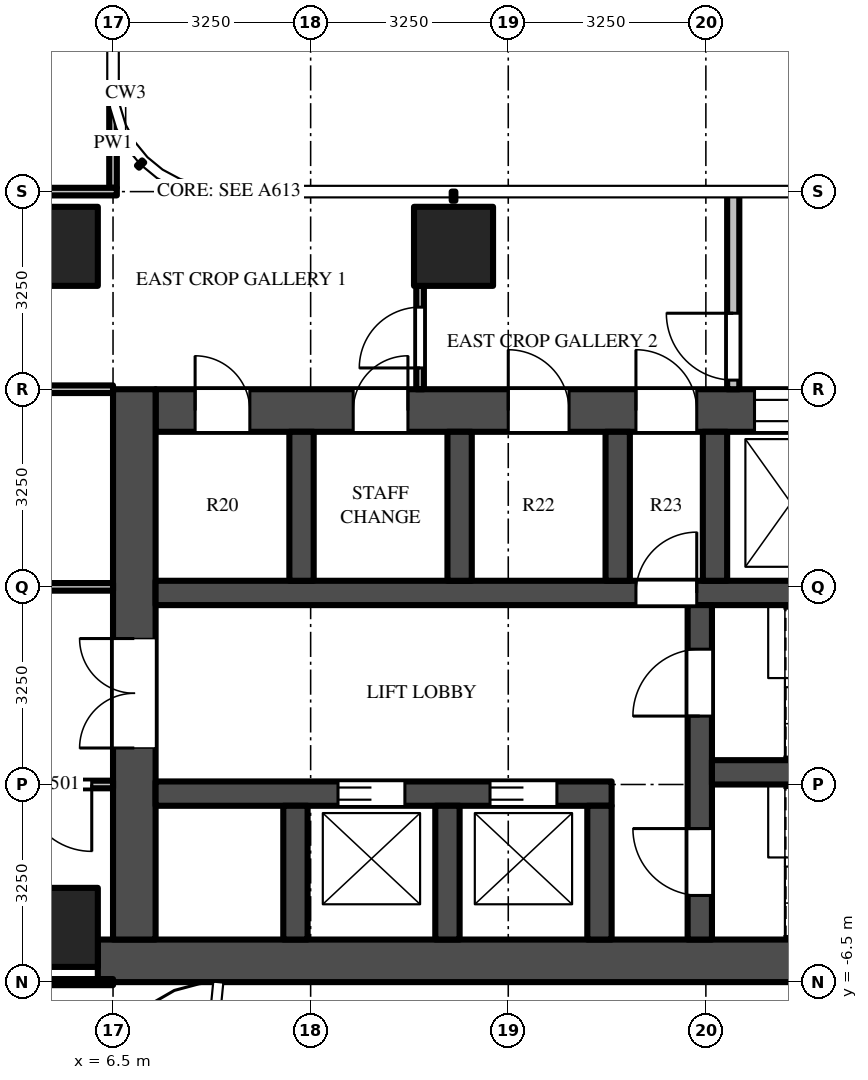
"""IFC4 building model, lengths in metres.
Left out: names, types, materials, properties, quantities, classifications, styles, units other than length and angle.
Written with IfcOpenShell. Run it as: python <this file> out.ifc"""

import sys

from ifc_helpers import new_model, si_unit, direction, frame, frame_2d, origin, origin_2d, place, context, subcontext, project, spatial, rectangle, extrude, source, transform, mapped, element, fill, save


model = new_model("IFC4")
c1 = context("Model", 3, precision=1e-05, world=origin(), true_north=direction((0.0, 1.0)))
c2 = subcontext(c1, "Body", "Model", "MODEL_VIEW")
j1 = project(units=[si_unit("LENGTHUNIT", "METRE"), si_unit("PLANEANGLEUNIT", "RADIAN")], contexts=[c1])
p1 = place(None, origin())
s1 = spatial("IfcSite", under=j1, at=p1, CompositionType="ELEMENT")
p2 = place(p1, origin())
s2 = spatial("IfcBuilding", under=s1, at=p2, CompositionType="ELEMENT")
p3 = place(p2, frame((0.0, 0.0, 106.5)))
s3 = spatial("IfcBuildingStorey", under=s2, at=p3, CompositionType="ELEMENT", Elevation=106.5)
m1 = source(origin(), c2, "Body", "SweptSolid", [
    extrude(rectangle(XDim=1.3, YDim=1.3, at=origin_2d()), origin(), (0.0, 0.0, 1.0), 4.5),
])
for number, where, z_axis, x_axis in (
    (1, (12.1, 5.6, 0.0), (0.0, 0.0, 1.0), (1.0, 0.0, 0.0)),
    (2, (5.6, 5.6, 0.0), (0.0, 0.0, 1.0), (1.0, 0.0, 0.0)),
    (3, (5.6, -5.6, 0.0), (0.0, 0.0, 1.0), (1.0, 0.0, 0.0)),
):
    element("IfcColumn", number, at=place(p3, frame(where, z_axis=z_axis, x_axis=x_axis)), inside=s3, PredefinedType="COLUMN", context=c2, shape_type="MappedRepresentation", body=[
        mapped(m1, transform((0.0, 0.0, 0.0))),
    ])
m2 = source(origin(), c2, "Body", "SweptSolid", [
    extrude(rectangle(XDim=16.5, YDim=0.7, at=frame_2d((8.25, 0.0))), origin(), (0.0, 0.0, 1.0), 4.25),
])
p4 = place(p3, frame((6.25, -6.15, 0.0), z_axis=(0.0, 0.0, 1.0), x_axis=(1.0, 0.0, 0.0)))
e4 = element("IfcWall", 4, at=p4, inside=s3, PredefinedType="SHEAR", context=c2, shape_type="MappedRepresentation", body=[
    mapped(m2, transform((0.0, 0.0, 0.0))),
])
m3 = source(origin(), c2, "Body", "SweptSolid", [
    extrude(rectangle(XDim=14.85, YDim=0.7, at=frame_2d((7.425, 0.0))), origin(), (0.0, 0.0, 1.0), 4.25),
])
p5 = place(p3, frame((7.2, 2.9, 0.0), z_axis=(0.0, 0.0, 1.0), x_axis=(1.0, 0.0, 0.0)))
e5 = element("IfcWall", 5, at=p5, inside=s3, PredefinedType="SHEAR", context=c2, shape_type="MappedRepresentation", body=[
    mapped(m3, transform((0.0, 0.0, 0.0))),
])
m4 = source(origin(), c2, "Body", "SweptSolid", [
    extrude(rectangle(XDim=1.3, YDim=2.1, at=frame_2d((0.65, 1.05))), frame((0.0, 0.36, 0.0), z_axis=(0.0, -1.0, 0.0), x_axis=(1.0, 0.0, 0.0)), (0.0, 0.0, 1.0), 0.72),
])
p6 = place(p5, frame((12.2, 0.0, 0.0)))
e6 = element("IfcOpeningElement", 6, at=p6, cuts=e5, PredefinedType="OPENING", context=c2, shape_type="MappedRepresentation", body=[
    mapped(m4, transform((0.0, 0.0, 0.0))),
])
m5 = source(origin(), c2, "Body", "SweptSolid", [
    extrude(rectangle(XDim=1.2, YDim=2.1, at=frame_2d((0.6, 1.05))), frame((0.0, 0.36, 0.0), z_axis=(0.0, -1.0, 0.0), x_axis=(1.0, 0.0, 0.0)), (0.0, 0.0, 1.0), 0.72),
])
p7 = place(p5, frame((9.85, 0.0, 0.0)))
e7 = element("IfcOpeningElement", 7, at=p7, cuts=e5, PredefinedType="OPENING", context=c2, shape_type="MappedRepresentation", body=[
    mapped(m5, transform((0.0, 0.0, 0.0))),
])
m6 = source(origin(), c2, "Body", "SweptSolid", [
    extrude(rectangle(XDim=1.0, YDim=2.1, at=frame_2d((0.5, 1.05))), frame((0.0, 0.36, 0.0), z_axis=(0.0, -1.0, 0.0), x_axis=(1.0, 0.0, 0.0)), (0.0, 0.0, 1.0), 0.72),
])
p8 = place(p5, frame((7.9, 0.0, 0.0)))
e8 = element("IfcOpeningElement", 8, at=p8, cuts=e5, PredefinedType="OPENING", context=c2, shape_type="MappedRepresentation", body=[
    mapped(m6, transform((0.0, 0.0, 0.0))),
])
m7 = source(origin(), c2, "Body", "SweptSolid", [
    extrude(rectangle(XDim=0.9, YDim=2.1, at=frame_2d((0.45, 1.05))), frame((0.0, 0.36, 0.0), z_axis=(0.0, -1.0, 0.0), x_axis=(1.0, 0.0, 0.0)), (0.0, 0.0, 1.0), 0.72),
])
p9 = place(p5, frame((0.65, 0.0, 0.0)))
e9 = element("IfcOpeningElement", 9, at=p9, cuts=e5, PredefinedType="OPENING", context=c2, shape_type="MappedRepresentation", body=[
    mapped(m7, transform((0.0, 0.0, 0.0))),
])
p10 = place(p5, frame((3.25, 0.0, 0.0)))
e10 = element("IfcOpeningElement", 10, at=p10, cuts=e5, PredefinedType="OPENING", context=c2, shape_type="MappedRepresentation", body=[
    mapped(m7, transform((0.0, 0.0, 0.0))),
])
p11 = place(p5, frame((5.8, 0.0, 0.0)))
e11 = element("IfcOpeningElement", 11, at=p11, cuts=e5, PredefinedType="OPENING", context=c2, shape_type="MappedRepresentation", body=[
    mapped(m6, transform((0.0, 0.0, 0.0))),
])
m8 = source(origin(), c2, "Body", "SweptSolid", [
    extrude(rectangle(XDim=9.05, YDim=0.7, at=frame_2d((4.525, 0.0))), origin(), (0.0, 0.0, 1.0), 4.25),
])
p12 = place(p3, frame((6.85, -5.8, 0.0), z_axis=(0.0, 0.0, 1.0), x_axis=(0.0, 1.0, 0.0)))
e12 = element("IfcWall", 12, at=p12, inside=s3, PredefinedType="SHEAR", context=c2, shape_type="MappedRepresentation", body=[
    mapped(m8, transform((0.0, 0.0, 0.0))),
])
m9 = source(origin(), c2, "Body", "SweptSolid", [
    extrude(rectangle(XDim=1.8, YDim=2.1, at=frame_2d((0.9, 1.05))), frame((0.0, 0.36, 0.0), z_axis=(0.0, -1.0, 0.0), x_axis=(1.0, 0.0, 0.0)), (0.0, 0.0, 1.0), 0.72),
])
p13 = place(p12, frame((3.15, 0.0, 0.0)))
e13 = element("IfcOpeningElement", 13, at=p13, cuts=e12, PredefinedType="OPENING", context=c2, shape_type="MappedRepresentation", body=[
    mapped(m9, transform((0.0, 0.0, 0.0))),
])
m10 = source(origin(), c2, "Body", "SweptSolid", [
    extrude(rectangle(XDim=7.5, YDim=0.4, at=frame_2d((3.75, 0.0))), origin(), (0.0, 0.0, 1.0), 4.25),
])
p14 = place(p3, frame((7.2, -3.4, 0.0), z_axis=(0.0, 0.0, 1.0), x_axis=(1.0, 0.0, 0.0)))
e14 = element("IfcWall", 14, at=p14, inside=s3, PredefinedType="SHEAR", context=c2, shape_type="MappedRepresentation", body=[
    mapped(m10, transform((0.0, 0.0, 0.0))),
])
m11 = source(origin(), c2, "Body", "SweptSolid", [
    extrude(rectangle(XDim=1.1, YDim=2.1, at=frame_2d((0.55, 1.05))), frame((0.0, 0.21, 0.0), z_axis=(0.0, -1.0, 0.0), x_axis=(1.0, 0.0, 0.0)), (0.0, 0.0, 1.0), 0.42),
])
p15 = place(p14, frame((3.0, 0.0, 0.0)))
e15 = element("IfcOpeningElement", 15, at=p15, cuts=e14, PredefinedType="OPENING", context=c2, shape_type="MappedRepresentation", body=[
    mapped(m11, transform((0.0, 0.0, 0.0))),
])
p16 = place(p14, frame((5.5, 0.0, 0.0)))
e16 = element("IfcOpeningElement", 16, at=p16, cuts=e14, PredefinedType="OPENING", context=c2, shape_type="MappedRepresentation", body=[
    mapped(m11, transform((0.0, 0.0, 0.0))),
])
m12 = source(origin(), c2, "Body", "SweptSolid", [
    extrude(rectangle(XDim=14.85, YDim=0.4, at=frame_2d((7.425, 0.0))), origin(), (0.0, 0.0, 1.0), 4.25),
])
p17 = place(p3, frame((7.2, -0.1, 0.0), z_axis=(0.0, 0.0, 1.0), x_axis=(1.0, 0.0, 0.0)))
e17 = element("IfcWall", 17, at=p17, inside=s3, PredefinedType="SHEAR", context=c2, shape_type="MappedRepresentation", body=[
    mapped(m12, transform((0.0, 0.0, 0.0))),
])
m13 = source(origin(), c2, "Body", "SweptSolid", [
    extrude(rectangle(XDim=1.0, YDim=2.1, at=frame_2d((0.5, 1.05))), frame((0.0, 0.21, 0.0), z_axis=(0.0, -1.0, 0.0), x_axis=(1.0, 0.0, 0.0)), (0.0, 0.0, 1.0), 0.42),
])
p18 = place(p17, frame((7.9, 0.0, 0.0)))
e18 = element("IfcOpeningElement", 18, at=p18, cuts=e17, PredefinedType="OPENING", context=c2, shape_type="MappedRepresentation", body=[
    mapped(m13, transform((0.0, 0.0, 0.0))),
])
m14 = source(origin(), c2, "Body", "SweptSolid", [
    extrude(rectangle(XDim=5.5, YDim=0.4, at=frame_2d((2.75, 0.0))), origin(), (0.0, 0.0, 1.0), 4.25),
])
p19 = place(p3, frame((16.15, -5.8, 0.0), z_axis=(0.0, 0.0, 1.0), x_axis=(0.0, 1.0, 0.0)))
e19 = element("IfcWall", 19, at=p19, inside=s3, PredefinedType="SHEAR", context=c2, shape_type="MappedRepresentation", body=[
    mapped(m14, transform((0.0, 0.0, 0.0))),
])
p20 = place(p19, frame((0.725, 0.0, 0.0)))
e20 = element("IfcOpeningElement", 20, at=p20, cuts=e19, PredefinedType="OPENING", context=c2, shape_type="MappedRepresentation", body=[
    mapped(m11, transform((0.0, 0.0, 0.0))),
])
p21 = place(p19, frame((3.675, 0.0, 0.0)))
e21 = element("IfcOpeningElement", 21, at=p21, cuts=e19, PredefinedType="OPENING", context=c2, shape_type="MappedRepresentation", body=[
    mapped(m11, transform((0.0, 0.0, 0.0))),
])
m15 = source(origin(), c2, "Body", "SweptSolid", [
    extrude(rectangle(XDim=5.7, YDim=0.4, at=frame_2d((2.85, 0.0))), origin(), (0.0, 0.0, 1.0), 4.25),
])
p22 = place(p3, frame((16.35, -3.05, 0.0), z_axis=(0.0, 0.0, 1.0), x_axis=(1.0, 0.0, 0.0)))
e22 = element("IfcWall", 22, at=p22, inside=s3, PredefinedType="SHEAR", context=c2, shape_type="MappedRepresentation", body=[
    mapped(m15, transform((0.0, 0.0, 0.0))),
])
m16 = source(origin(), c2, "Body", "SweptSolid", [
    extrude(rectangle(XDim=2.2, YDim=0.4, at=frame_2d((1.1, 0.0))), origin(), (0.0, 0.0, 1.0), 4.25),
])
for number, where, z_axis, x_axis in (
    (23, (9.5, -5.8, 0.0), (0.0, 0.0, 1.0), (0.0, 1.0, 0.0)),
    (24, (12.0, -5.8, 0.0), (0.0, 0.0, 1.0), (0.0, 1.0, 0.0)),
    (25, (14.5, -5.8, 0.0), (0.0, 0.0, 1.0), (0.0, 1.0, 0.0)),
):
    element("IfcWall", number, at=place(p3, frame(where, z_axis=z_axis, x_axis=x_axis)), inside=s3, PredefinedType="SHEAR", context=c2, shape_type="MappedRepresentation", body=[
        mapped(m16, transform((0.0, 0.0, 0.0))),
    ])
m17 = source(origin(), c2, "Body", "SweptSolid", [
    extrude(rectangle(XDim=2.45, YDim=0.4, at=frame_2d((1.225, 0.0))), origin(), (0.0, 0.0, 1.0), 4.25),
])
for number, where, z_axis, x_axis in (
    (26, (9.6, 0.1, 0.0), (0.0, 0.0, 1.0), (0.0, 1.0, 0.0)),
    (27, (12.2, 0.1, 0.0), (0.0, 0.0, 1.0), (0.0, 1.0, 0.0)),
    (28, (14.8, 0.1, 0.0), (0.0, 0.0, 1.0), (0.0, 1.0, 0.0)),
    (29, (16.4, 0.1, 0.0), (0.0, 0.0, 1.0), (0.0, 1.0, 0.0)),
):
    element("IfcWall", number, at=place(p3, frame(where, z_axis=z_axis, x_axis=x_axis)), inside=s3, PredefinedType="SHEAR", context=c2, shape_type="MappedRepresentation", body=[
        mapped(m17, transform((0.0, 0.0, 0.0))),
    ])
m18 = source(origin(), c2, "Body", "SweptSolid", [
    extrude(rectangle(XDim=3.25, YDim=0.2, at=frame_2d((1.625, 0.0))), origin(), (0.0, 0.0, 1.0), 4.25),
])
p23 = place(p3, frame((16.7, 3.25, 0.0), z_axis=(0.0, 0.0, 1.0), x_axis=(0.0, 1.0, 0.0)))
e30 = element("IfcWall", 30, at=p23, inside=s3, PredefinedType="PARTITIONING", context=c2, shape_type="MappedRepresentation", body=[
    mapped(m18, transform((0.0, 0.0, 0.0))),
])
m19 = source(origin(), c2, "Body", "SweptSolid", [
    extrude(rectangle(XDim=1.1, YDim=2.1, at=frame_2d((0.55, 1.05))), frame((0.0, 0.11, 0.0), z_axis=(0.0, -1.0, 0.0), x_axis=(1.0, 0.0, 0.0)), (0.0, 0.0, 1.0), 0.22),
])
p24 = place(p23, frame((0.15, 0.0, 0.0)))
e31 = element("IfcOpeningElement", 31, at=p24, cuts=e30, PredefinedType="OPENING", context=c2, shape_type="MappedRepresentation", body=[
    mapped(m19, transform((0.0, 0.0, 0.0))),
])
m20 = source(origin(), c2, "Body", "SweptSolid", [
    extrude(rectangle(XDim=1.469, YDim=0.125, at=frame_2d((0.734, 0.0))), origin(), (0.0, 0.0, 1.0), 4.25),
])
p25 = place(p3, frame((6.5, 6.562, 0.0), z_axis=(0.0, 0.0, 1.0), x_axis=(0.0, 1.0, 0.0)))
e32 = element("IfcWall", 32, at=p25, inside=s3, PredefinedType="PARTITIONING", context=c2, shape_type="MappedRepresentation", body=[
    mapped(m20, transform((0.0, 0.0, 0.0))),
])
m21 = source(origin(), c2, "Body", "SweptSolid", [
    extrude(rectangle(XDim=1.7, YDim=0.125, at=frame_2d((0.85, 0.0))), origin(), (0.0, 0.0, 1.0), 4.25),
])
p26 = place(p3, frame((11.55, 3.25, 0.0), z_axis=(0.0, 0.0, 1.0), x_axis=(0.0, 1.0, 0.0)))
e33 = element("IfcWall", 33, at=p26, inside=s3, PredefinedType="PARTITIONING", context=c2, shape_type="MappedRepresentation", body=[
    mapped(m21, transform((0.0, 0.0, 0.0))),
])
m22 = source(origin(), c2, "Body", "SweptSolid", [
    extrude(rectangle(XDim=1.0, YDim=2.1, at=frame_2d((0.5, 1.05))), frame((0.0, 0.073, 0.0), z_axis=(0.0, -1.0, 0.0), x_axis=(1.0, 0.0, 0.0)), (0.0, 0.0, 1.0), 0.145),
])
p27 = place(p26, frame((0.35, 0.0, 0.0)))
e34 = element("IfcOpeningElement", 34, at=p27, cuts=e33, PredefinedType="OPENING", context=c2, shape_type="MappedRepresentation", body=[
    mapped(m22, transform((0.0, 0.0, 0.0))),
])
m23 = source(origin(), c2, "Body", "SweptSolid", [
    extrude(rectangle(XDim=5.363, YDim=0.1, at=frame_2d((2.681, 0.0))), origin(), (0.0, 0.0, 1.0), 3.33),
])
p28 = place(p3, frame((1.137, -6.5, 0.0), z_axis=(0.0, 0.0, 1.0), x_axis=(1.0, 0.0, 0.0)))
e35 = element("IfcWall", 35, at=p28, inside=s3, PredefinedType="PARTITIONING", context=c2, shape_type="MappedRepresentation", body=[
    mapped(m23, transform((0.0, 0.0, 0.0))),
])
m24 = source(origin(), c2, "Body", "SweptSolid", [
    extrude(rectangle(XDim=5.363, YDim=0.125, at=frame_2d((2.681, 0.0))), origin(), (0.0, 0.0, 1.0), 3.468),
])
p29 = place(p3, frame((6.5, -3.25, 0.0), z_axis=(0.0, 0.0, 1.0), x_axis=(-1.0, 0.0, 0.0)))
e36 = element("IfcWall", 36, at=p29, inside=s3, PredefinedType="PARTITIONING", context=c2, shape_type="MappedRepresentation", body=[
    mapped(m24, transform((0.0, 0.0, 0.0))),
])
m25 = source(origin(), c2, "Body", "SweptSolid", [
    extrude(rectangle(XDim=1.1, YDim=2.1, at=frame_2d((0.55, 1.05))), frame((0.0, 0.073, 0.0), z_axis=(0.0, -1.0, 0.0), x_axis=(1.0, 0.0, 0.0)), (0.0, 0.0, 1.0), 0.145),
])
p30 = place(p29, frame((0.35, 0.0, 0.0)))
e37 = element("IfcOpeningElement", 37, at=p30, cuts=e36, PredefinedType="OPENING", context=c2, shape_type="MappedRepresentation", body=[
    mapped(m25, transform((0.0, 0.0, 0.0))),
])
p31 = place(p3, frame((6.5, 0.0, 0.0), z_axis=(0.0, 0.0, 1.0), x_axis=(-1.0, 0.0, 0.0)))
e38 = element("IfcWall", 38, at=p31, inside=s3, PredefinedType="PARTITIONING", context=c2, shape_type="MappedRepresentation", body=[
    mapped(m24, transform((0.0, 0.0, 0.0))),
])
p32 = place(p31, frame((3.95, 0.0, 0.0)))
e39 = element("IfcOpeningElement", 39, at=p32, cuts=e38, PredefinedType="OPENING", context=c2, shape_type="MappedRepresentation", body=[
    mapped(m22, transform((0.0, 0.0, 0.0))),
])
p33 = place(p3, frame((1.137, 3.25, 0.0), z_axis=(0.0, 0.0, 1.0), x_axis=(1.0, 0.0, 0.0)))
e40 = element("IfcWall", 40, at=p33, inside=s3, PredefinedType="PARTITIONING", context=c2, shape_type="MappedRepresentation", body=[
    mapped(m24, transform((0.0, 0.0, 0.0))),
])
m26 = source(origin(), c2, "Body", "SweptSolid", [
    extrude(rectangle(XDim=3.725, YDim=0.125, at=frame_2d((1.863, 0.0))), origin(), (0.0, 0.0, 1.0), 3.33),
])
p34 = place(p3, frame((2.837, 6.5, 0.0), z_axis=(0.0, 0.0, 1.0), x_axis=(1.0, 0.0, 0.0)))
e41 = element("IfcWall", 41, at=p34, inside=s3, PredefinedType="PARTITIONING", context=c2, shape_type="MappedRepresentation", body=[
    mapped(m26, transform((0.0, 0.0, 0.0))),
])
m27 = source(origin(), c2, "Body", "SweptSolid", [
    extrude(rectangle(XDim=1.1, YDim=2.1, at=frame_2d((0.55, 1.05))), frame((0.0, 0.025, 0.0), z_axis=(0.0, -1.0, 0.0), x_axis=(1.0, 0.0, 0.0)), (0.0, 0.0, 1.0), 0.05),
])
p35 = place(p15, origin())
e42 = element("IfcDoor", 42, at=p35, inside=s3, OperationType="DOUBLE_DOOR_SLIDING", PredefinedType="DOOR", context=c2, shape_type="MappedRepresentation", body=[
    mapped(m27, transform((0.0, 0.0, 0.0))),
])
fill(e15, e42)
p36 = place(p16, origin())
e43 = element("IfcDoor", 43, at=p36, inside=s3, OperationType="DOUBLE_DOOR_SLIDING", PredefinedType="DOOR", context=c2, shape_type="MappedRepresentation", body=[
    mapped(m27, transform((0.0, 0.0, 0.0))),
])
fill(e16, e43)
m28 = source(origin(), c2, "Body", "SweptSolid", [
    extrude(rectangle(XDim=1.2, YDim=2.1, at=frame_2d((0.6, 1.05))), frame((0.0, -0.275, 0.0), z_axis=(0.0, -1.0, 0.0), x_axis=(1.0, 0.0, 0.0)), (0.0, 0.0, 1.0), 0.05),
])
p37 = place(p7, origin())
e44 = element("IfcDoor", 44, at=p37, inside=s3, OperationType="DOUBLE_DOOR_SLIDING", PredefinedType="DOOR", context=c2, shape_type="MappedRepresentation", body=[
    mapped(m28, transform((0.0, 0.0, 0.0))),
])
fill(e7, e44)
m29 = source(origin(), c2, "Body", "SweptSolid", [
    extrude(rectangle(XDim=1.8, YDim=2.1, at=frame_2d((0.9, 1.05))), frame((0.0, -0.275, 0.0), z_axis=(0.0, -1.0, 0.0), x_axis=(1.0, 0.0, 0.0)), (0.0, 0.0, 1.0), 0.05),
])
p38 = place(p13, origin())
e45 = element("IfcDoor", 45, at=p38, inside=s3, OperationType="DOUBLE_DOOR_SINGLE_SWING", PredefinedType="DOOR", context=c2, shape_type="MappedRepresentation", body=[
    mapped(m29, transform((0.0, 0.0, 0.0))),
])
fill(e13, e45)
p39 = place(p20, origin())
e46 = element("IfcDoor", 46, at=p39, inside=s3, OperationType="SINGLE_SWING_RIGHT", PredefinedType="DOOR", context=c2, shape_type="MappedRepresentation", body=[
    mapped(m27, transform((0.0, 0.0, 0.0))),
])
fill(e20, e46)
p40 = place(p21, origin())
e47 = element("IfcDoor", 47, at=p40, inside=s3, OperationType="SINGLE_SWING_LEFT", PredefinedType="DOOR", context=c2, shape_type="MappedRepresentation", body=[
    mapped(m27, transform((0.0, 0.0, 0.0))),
])
fill(e21, e47)
m30 = source(origin(), c2, "Body", "SweptSolid", [
    extrude(rectangle(XDim=1.0, YDim=2.1, at=frame_2d((0.5, 1.05))), frame((0.0, 0.025, 0.0), z_axis=(0.0, -1.0, 0.0), x_axis=(1.0, 0.0, 0.0)), (0.0, 0.0, 1.0), 0.05),
])
p41 = place(p18, origin())
e48 = element("IfcDoor", 48, at=p41, inside=s3, OperationType="SINGLE_SWING_RIGHT", PredefinedType="DOOR", context=c2, shape_type="MappedRepresentation", body=[
    mapped(m30, transform((0.0, 0.0, 0.0))),
])
fill(e18, e48)
m31 = source(origin(), c2, "Body", "SweptSolid", [
    extrude(rectangle(XDim=1.0, YDim=2.1, at=frame_2d((0.5, 1.05))), frame((0.0, -0.275, 0.0), z_axis=(0.0, -1.0, 0.0), x_axis=(1.0, 0.0, 0.0)), (0.0, 0.0, 1.0), 0.05),
])
p42 = place(p8, origin())
e49 = element("IfcDoor", 49, at=p42, inside=s3, OperationType="SINGLE_SWING_LEFT", PredefinedType="DOOR", context=c2, shape_type="MappedRepresentation", body=[
    mapped(m31, transform((0.0, 0.0, 0.0))),
])
fill(e8, e49)
p43 = place(p24, origin())
e50 = element("IfcDoor", 50, at=p43, inside=s3, OperationType="SINGLE_SWING_RIGHT", PredefinedType="DOOR", context=c2, shape_type="MappedRepresentation", body=[
    mapped(m27, transform((0.0, 0.0, 0.0))),
])
fill(e31, e50)
m32 = source(origin(), c2, "Body", "SweptSolid", [
    extrude(rectangle(XDim=0.9, YDim=2.1, at=frame_2d((0.45, 1.05))), frame((0.0, -0.275, 0.0), z_axis=(0.0, -1.0, 0.0), x_axis=(1.0, 0.0, 0.0)), (0.0, 0.0, 1.0), 0.05),
])
p44 = place(p9, origin())
e51 = element("IfcDoor", 51, at=p44, inside=s3, OperationType="SINGLE_SWING_LEFT", PredefinedType="DOOR", context=c2, shape_type="MappedRepresentation", body=[
    mapped(m32, transform((0.0, 0.0, 0.0))),
])
fill(e9, e51)
p45 = place(p10, origin())
e52 = element("IfcDoor", 52, at=p45, inside=s3, OperationType="SINGLE_SWING_RIGHT", PredefinedType="DOOR", context=c2, shape_type="MappedRepresentation", body=[
    mapped(m32, transform((0.0, 0.0, 0.0))),
])
fill(e10, e52)
p46 = place(p11, origin())
e53 = element("IfcDoor", 53, at=p46, inside=s3, OperationType="SINGLE_SWING_LEFT", PredefinedType="DOOR", context=c2, shape_type="MappedRepresentation", body=[
    mapped(m31, transform((0.0, 0.0, 0.0))),
])
fill(e11, e53)
p47 = place(p30, origin())
e54 = element("IfcDoor", 54, at=p47, inside=s3, OperationType="SINGLE_SWING_LEFT", PredefinedType="DOOR", context=c2, shape_type="MappedRepresentation", body=[
    mapped(m27, transform((0.0, 0.0, 0.0))),
])
fill(e37, e54)
p48 = place(p27, origin())
e55 = element("IfcDoor", 55, at=p48, inside=s3, OperationType="SINGLE_SWING_LEFT", PredefinedType="DOOR", context=c2, shape_type="MappedRepresentation", body=[
    mapped(m30, transform((0.0, 0.0, 0.0))),
])
fill(e34, e55)
save(model, sys.argv[1])
